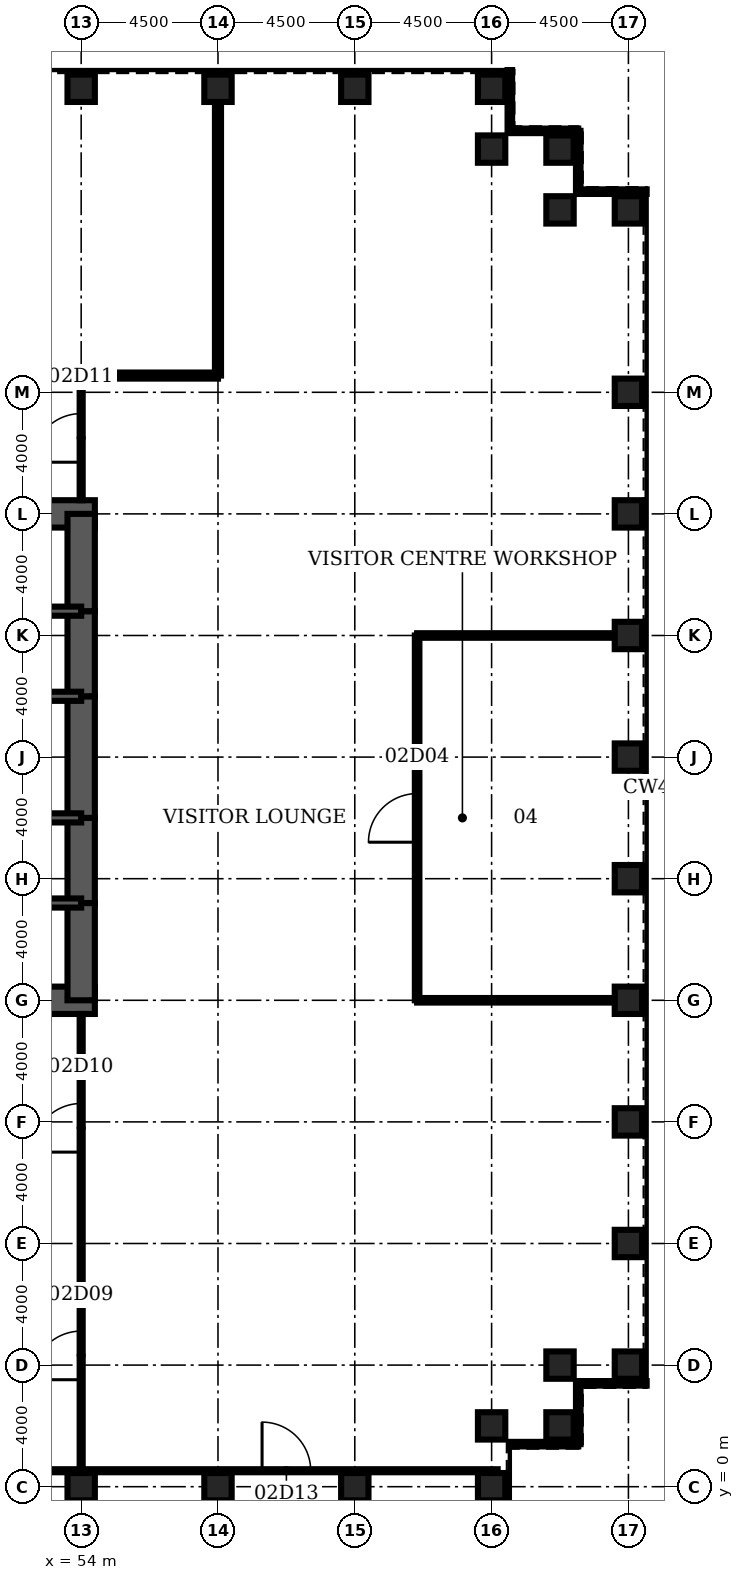
"""IFC4 building model, lengths in metres.
Left out: names, types, materials, properties, quantities, classifications, styles, units other than length and angle.
Written with IfcOpenShell. Run it as: python <this file> out.ifc"""

import sys

from ifc_helpers import new_model, si_unit, direction, frame, frame_2d, origin, origin_2d, place, context, subcontext, project, spatial, rectangle, hollow_rectangle, extrude, element, fill, save


model = new_model("IFC4")
c1 = context("Model", 3, precision=1e-05, world=origin(), true_north=direction((0.0, 1.0)))
c2 = subcontext(c1, "Body", "Model", "MODEL_VIEW")
j1 = project(units=[si_unit("LENGTHUNIT", "METRE"), si_unit("PLANEANGLEUNIT", "RADIAN")], contexts=[c1])
p1 = place(None, origin())
s1 = spatial("IfcSite", under=j1, at=p1, CompositionType="ELEMENT")
p2 = place(p1, origin())
s2 = spatial("IfcBuilding", under=s1, at=p2, CompositionType="ELEMENT")
p3 = place(p2, frame((0.0, 0.0, 13.0)))
s3 = spatial("IfcBuildingStorey", under=s2, at=p3, CompositionType="ELEMENT", Elevation=13.0)
for number, where, z_axis, x_axis in (
    (1, (54.0, 0.0, 0.0), (0.0, 0.0, 1.0), (0.0, 1.0, 0.0)),
    (2, (58.5, 0.0, 0.0), (0.0, 0.0, 1.0), (0.0, 1.0, 0.0)),
    (3, (63.0, 0.0, 0.0), (0.0, 0.0, 1.0), (0.0, 1.0, 0.0)),
    (4, (67.5, 0.0, 0.0), (0.0, 0.0, 1.0), (0.0, 1.0, 0.0)),
    (5, (67.5, 2.0, 0.0), (0.0, 0.0, 1.0), (0.0, 1.0, 0.0)),
    (6, (69.75, 2.0, 0.0), (0.0, 0.0, 1.0), (1.0, 0.0, 0.0)),
    (7, (69.75, 4.0, 0.0), (0.0, 0.0, 1.0), (1.0, 0.0, 0.0)),
    (8, (72.0, 4.0, 0.0), (0.0, 0.0, 1.0), (1.0, 0.0, 0.0)),
    (9, (72.0, 8.0, 0.0), (0.0, 0.0, 1.0), (1.0, 0.0, 0.0)),
    (10, (72.0, 12.0, 0.0), (0.0, 0.0, 1.0), (1.0, 0.0, 0.0)),
    (11, (72.0, 16.0, 0.0), (0.0, 0.0, 1.0), (1.0, 0.0, 0.0)),
    (12, (72.0, 20.0, 0.0), (0.0, 0.0, 1.0), (1.0, 0.0, 0.0)),
    (13, (72.0, 24.0, 0.0), (0.0, 0.0, 1.0), (1.0, 0.0, 0.0)),
    (14, (72.0, 28.0, 0.0), (0.0, 0.0, 1.0), (1.0, 0.0, 0.0)),
    (15, (72.0, 32.0, 0.0), (0.0, 0.0, 1.0), (1.0, 0.0, 0.0)),
    (16, (72.0, 36.0, 0.0), (0.0, 0.0, 1.0), (1.0, 0.0, 0.0)),
    (17, (72.0, 42.0, 0.0), (0.0, 0.0, 1.0), (1.0, 0.0, 0.0)),
    (18, (69.75, 42.0, 0.0), (0.0, 0.0, 1.0), (1.0, 0.0, 0.0)),
    (19, (69.75, 44.0, 0.0), (0.0, 0.0, 1.0), (1.0, 0.0, 0.0)),
    (20, (67.5, 44.0, 0.0), (0.0, 0.0, 1.0), (0.0, 1.0, 0.0)),
    (21, (67.5, 46.0, 0.0), (0.0, 0.0, 1.0), (0.0, 1.0, 0.0)),
    (22, (63.0, 46.0, 0.0), (0.0, 0.0, 1.0), (0.0, 1.0, 0.0)),
    (23, (58.5, 46.0, 0.0), (0.0, 0.0, 1.0), (0.0, 1.0, 0.0)),
    (24, (54.0, 46.0, 0.0), (0.0, 0.0, 1.0), (0.0, 1.0, 0.0)),
):
    element("IfcColumn", number, at=place(p3, frame(where, z_axis=z_axis, x_axis=x_axis)), inside=s3, PredefinedType="COLUMN", context=c2, shape_type="SweptSolid", body=[
        extrude(hollow_rectangle(XDim=0.9, YDim=0.9, WallThickness=0.12, at=origin_2d()), origin(), (0.0, 0.0, 1.0), 5.0),
    ])
for number, where, z_axis, x_axis in (
    (25, (45.0, 16.0, 0.0), (0.0, 0.0, 1.0), (1.0, 0.0, 0.0)),
    (26, (54.45, 32.0, 0.0), (0.0, 0.0, 1.0), (-1.0, 0.0, 0.0)),
):
    element("IfcWall", number, at=place(p3, frame(where, z_axis=z_axis, x_axis=x_axis)), inside=s3, PredefinedType="SHEAR", context=c2, shape_type="SweptSolid", body=[
        extrude(rectangle(XDim=9.45, YDim=0.9, at=frame_2d((4.725, 0.0))), origin(), (0.0, 0.0, 1.0), 5.0),
    ])
p4 = place(p3, frame((54.0, 16.0, 0.0), z_axis=(0.0, 0.0, 1.0), x_axis=(0.0, 1.0, 0.0)))
e27 = element("IfcWall", 27, at=p4, inside=s3, PredefinedType="SHEAR", context=c2, shape_type="SweptSolid", body=[
    extrude(rectangle(XDim=3.2, YDim=0.9, at=frame_2d((1.6, 0.0))), origin(), (0.0, 0.0, 1.0), 5.0),
])
p5 = place(p3, frame((54.0, 19.2, 0.0), z_axis=(0.0, 0.0, 1.0), x_axis=(0.0, 1.0, 0.0)))
e28 = element("IfcWall", 28, at=p5, inside=s3, PredefinedType="SHEAR", context=c2, shape_type="SweptSolid", body=[
    extrude(rectangle(XDim=2.8, YDim=0.9, at=frame_2d((1.4, 0.0))), origin(), (0.0, 0.0, 1.0), 5.0),
])
p6 = place(p5, frame((0.4, 0.0, 0.0)))
e29 = element("IfcOpeningElement", 29, at=p6, cuts=e28, PredefinedType="OPENING", context=c2, shape_type="SweptSolid", body=[
    extrude(rectangle(XDim=1.8, YDim=2.1, at=frame_2d((0.9, 1.05))), frame((0.0, 0.46, 0.0), z_axis=(0.0, -1.0, 0.0), x_axis=(1.0, 0.0, 0.0)), (0.0, 0.0, 1.0), 0.92),
])
p7 = place(p3, frame((54.0, 22.0, 0.0), z_axis=(0.0, 0.0, 1.0), x_axis=(0.0, 1.0, 0.0)))
e30 = element("IfcWall", 30, at=p7, inside=s3, PredefinedType="SHEAR", context=c2, shape_type="SweptSolid", body=[
    extrude(rectangle(XDim=4.0, YDim=0.9, at=frame_2d((2.0, 0.0))), origin(), (0.0, 0.0, 1.0), 5.0),
])
p8 = place(p3, frame((54.0, 26.0, 0.0), z_axis=(0.0, 0.0, 1.0), x_axis=(0.0, 1.0, 0.0)))
e31 = element("IfcWall", 31, at=p8, inside=s3, PredefinedType="SHEAR", context=c2, shape_type="SweptSolid", body=[
    extrude(rectangle(XDim=2.8, YDim=0.9, at=frame_2d((1.4, 0.0))), origin(), (0.0, 0.0, 1.0), 5.0),
])
p9 = place(p8, frame((0.6, 0.0, 0.0)))
e32 = element("IfcOpeningElement", 32, at=p9, cuts=e31, PredefinedType="OPENING", context=c2, shape_type="SweptSolid", body=[
    extrude(rectangle(XDim=1.8, YDim=2.1, at=frame_2d((0.9, 1.05))), frame((0.0, 0.46, 0.0), z_axis=(0.0, -1.0, 0.0), x_axis=(1.0, 0.0, 0.0)), (0.0, 0.0, 1.0), 0.92),
])
p10 = place(p3, frame((54.0, 28.8, 0.0), z_axis=(0.0, 0.0, 1.0), x_axis=(0.0, 1.0, 0.0)))
e33 = element("IfcWall", 33, at=p10, inside=s3, PredefinedType="SHEAR", context=c2, shape_type="SweptSolid", body=[
    extrude(rectangle(XDim=3.2, YDim=0.9, at=frame_2d((1.6, 0.0))), origin(), (0.0, 0.0, 1.0), 5.0),
])
p11 = place(p3, frame((45.0, 19.2, 0.0), z_axis=(0.0, 0.0, 1.0), x_axis=(1.0, 0.0, 0.0)))
e34 = element("IfcWall", 34, at=p11, inside=s3, PredefinedType="SOLIDWALL", context=c2, shape_type="SweptSolid", body=[
    extrude(rectangle(XDim=9.0, YDim=0.3, at=frame_2d((4.5, 0.0))), origin(), (0.0, 0.0, 1.0), 5.0),
])
p12 = place(p11, frame((7.35, 0.0, 0.0)))
e35 = element("IfcOpeningElement", 35, at=p12, cuts=e34, PredefinedType="OPENING", context=c2, shape_type="SweptSolid", body=[
    extrude(rectangle(XDim=1.0, YDim=2.1, at=frame_2d((0.5, 1.05))), frame((0.0, 0.16, 0.0), z_axis=(0.0, -1.0, 0.0), x_axis=(1.0, 0.0, 0.0)), (0.0, 0.0, 1.0), 0.32),
])
p13 = place(p3, frame((45.0, 28.8, 0.0), z_axis=(0.0, 0.0, 1.0), x_axis=(1.0, 0.0, 0.0)))
e36 = element("IfcWall", 36, at=p13, inside=s3, PredefinedType="SOLIDWALL", context=c2, shape_type="SweptSolid", body=[
    extrude(rectangle(XDim=9.0, YDim=0.3, at=frame_2d((4.5, 0.0))), origin(), (0.0, 0.0, 1.0), 5.0),
])
p14 = place(p13, frame((7.35, 0.0, 0.0)))
e37 = element("IfcOpeningElement", 37, at=p14, cuts=e36, PredefinedType="OPENING", context=c2, shape_type="SweptSolid", body=[
    extrude(rectangle(XDim=1.0, YDim=2.1, at=frame_2d((0.5, 1.05))), frame((0.0, 0.16, 0.0), z_axis=(0.0, -1.0, 0.0), x_axis=(1.0, 0.0, 0.0)), (0.0, 0.0, 1.0), 0.32),
])
p15 = place(p3, frame((48.0, 22.0, 0.0), z_axis=(0.0, 0.0, 1.0), x_axis=(1.0, 0.0, 0.0)))
e38 = element("IfcWall", 38, at=p15, inside=s3, PredefinedType="SOLIDWALL", context=c2, shape_type="SweptSolid", body=[
    extrude(rectangle(XDim=6.0, YDim=0.3, at=frame_2d((3.0, 0.0))), origin(), (0.0, 0.0, 1.0), 5.0),
])
p16 = place(p15, frame((2.0, 0.0, 0.0)))
e39 = element("IfcOpeningElement", 39, at=p16, cuts=e38, PredefinedType="OPENING", context=c2, shape_type="SweptSolid", body=[
    extrude(rectangle(XDim=1.0, YDim=2.1, at=frame_2d((0.5, 1.05))), frame((0.0, 0.16, 0.0), z_axis=(0.0, -1.0, 0.0), x_axis=(1.0, 0.0, 0.0)), (0.0, 0.0, 1.0), 0.32),
])
p17 = place(p15, frame((4.15, 0.0, 0.0)))
e40 = element("IfcOpeningElement", 40, at=p17, cuts=e38, PredefinedType="OPENING", context=c2, shape_type="SweptSolid", body=[
    extrude(rectangle(XDim=1.0, YDim=2.1, at=frame_2d((0.5, 1.05))), frame((0.0, 0.16, 0.0), z_axis=(0.0, -1.0, 0.0), x_axis=(1.0, 0.0, 0.0)), (0.0, 0.0, 1.0), 0.32),
])
p18 = place(p3, frame((48.0, 26.0, 0.0), z_axis=(0.0, 0.0, 1.0), x_axis=(1.0, 0.0, 0.0)))
e41 = element("IfcWall", 41, at=p18, inside=s3, PredefinedType="SOLIDWALL", context=c2, shape_type="SweptSolid", body=[
    extrude(rectangle(XDim=6.0, YDim=0.3, at=frame_2d((3.0, 0.0))), origin(), (0.0, 0.0, 1.0), 5.0),
])
for number, where, z_axis, x_axis in (
    (42, (65.05, 16.0, 0.0), (0.0, 0.0, 1.0), (1.0, 0.0, 0.0)),
    (43, (65.05, 28.0, 0.0), (0.0, 0.0, 1.0), (1.0, 0.0, 0.0)),
):
    element("IfcWall", number, at=place(p3, frame(where, z_axis=z_axis, x_axis=x_axis)), inside=s3, PredefinedType="PARTITIONING", context=c2, shape_type="SweptSolid", body=[
        extrude(rectangle(XDim=6.5, YDim=0.15, at=frame_2d((3.25, 0.0))), origin(), (0.0, 0.0, 1.0), 3.0),
    ])
p19 = place(p3, frame((13.5, 36.55, 0.0), z_axis=(0.0, 0.0, 1.0), x_axis=(1.0, 0.0, 0.0)))
e44 = element("IfcWall", 44, at=p19, inside=s3, PredefinedType="PARTITIONING", context=c2, shape_type="SweptSolid", body=[
    extrude(rectangle(XDim=45.0, YDim=0.2, at=frame_2d((22.5, 0.0))), origin(), (0.0, 0.0, 1.0), 3.0),
])
p20 = place(p19, frame((21.7, 0.0, 0.0)))
e45 = element("IfcOpeningElement", 45, at=p20, cuts=e44, PredefinedType="OPENING", context=c2, shape_type="SweptSolid", body=[
    extrude(rectangle(XDim=1.6, YDim=2.1, at=frame_2d((0.8, 1.05))), frame((0.0, 0.11, 0.0), z_axis=(0.0, -1.0, 0.0), x_axis=(1.0, 0.0, 0.0)), (0.0, 0.0, 1.0), 0.22),
])
p21 = place(p3, frame((54.0, 0.575, 0.0), z_axis=(0.0, 0.0, 1.0), x_axis=(0.0, 1.0, 0.0)))
e46 = element("IfcWall", 46, at=p21, inside=s3, PredefinedType="PARTITIONING", context=c2, shape_type="SweptSolid", body=[
    extrude(rectangle(XDim=14.975, YDim=0.1, at=frame_2d((7.488, 0.0))), origin(), (0.0, 0.0, 1.0), 3.0),
])
p22 = place(p21, frame((2.944, 0.0, 0.0)))
e47 = element("IfcOpeningElement", 47, at=p22, cuts=e46, PredefinedType="OPENING", context=c2, shape_type="SweptSolid", body=[
    extrude(rectangle(XDim=1.6, YDim=2.1, at=frame_2d((0.8, 1.05))), frame((0.0, 0.06, 0.0), z_axis=(0.0, -1.0, 0.0), x_axis=(1.0, 0.0, 0.0)), (0.0, 0.0, 1.0), 0.12),
])
p23 = place(p21, frame((10.431, 0.0, 0.0)))
e48 = element("IfcOpeningElement", 48, at=p23, cuts=e46, PredefinedType="OPENING", context=c2, shape_type="SweptSolid", body=[
    extrude(rectangle(XDim=1.6, YDim=2.1, at=frame_2d((0.8, 1.05))), frame((0.0, 0.06, 0.0), z_axis=(0.0, -1.0, 0.0), x_axis=(1.0, 0.0, 0.0)), (0.0, 0.0, 1.0), 0.12),
])
p24 = place(p3, frame((54.0, 32.45, 0.0), z_axis=(0.0, 0.0, 1.0), x_axis=(0.0, 1.0, 0.0)))
e49 = element("IfcWall", 49, at=p24, inside=s3, PredefinedType="PARTITIONING", context=c2, shape_type="SweptSolid", body=[
    extrude(rectangle(XDim=4.1, YDim=0.1, at=frame_2d((2.05, 0.0))), origin(), (0.0, 0.0, 1.0), 3.0),
])
p25 = place(p24, frame((1.25, 0.0, 0.0)))
e50 = element("IfcOpeningElement", 50, at=p25, cuts=e49, PredefinedType="OPENING", context=c2, shape_type="SweptSolid", body=[
    extrude(rectangle(XDim=1.6, YDim=2.1, at=frame_2d((0.8, 1.05))), frame((0.0, 0.06, 0.0), z_axis=(0.0, -1.0, 0.0), x_axis=(1.0, 0.0, 0.0)), (0.0, 0.0, 1.0), 0.12),
])
p26 = place(p3, frame((58.5, 36.55, 0.0), z_axis=(0.0, 0.0, 1.0), x_axis=(0.0, 1.0, 0.0)))
e51 = element("IfcWall", 51, at=p26, inside=s3, PredefinedType="PARTITIONING", context=c2, shape_type="SweptSolid", body=[
    extrude(rectangle(XDim=9.0, YDim=0.2, at=frame_2d((4.5, 0.0))), origin(), (0.0, 0.0, 1.0), 3.0),
])
p27 = place(p3, frame((65.05, 16.0, 0.0), z_axis=(0.0, 0.0, 1.0), x_axis=(0.0, 1.0, 0.0)))
e52 = element("IfcWall", 52, at=p27, inside=s3, PredefinedType="PARTITIONING", context=c2, shape_type="SweptSolid", body=[
    extrude(rectangle(XDim=12.0, YDim=0.15, at=frame_2d((6.0, 0.0))), origin(), (0.0, 0.0, 1.0), 3.0),
])
p28 = place(p27, frame((5.2, 0.0, 0.0)))
e53 = element("IfcOpeningElement", 53, at=p28, cuts=e52, PredefinedType="OPENING", context=c2, shape_type="SweptSolid", body=[
    extrude(rectangle(XDim=1.6, YDim=2.1, at=frame_2d((0.8, 1.05))), frame((0.0, 0.085, 0.0), z_axis=(0.0, -1.0, 0.0), x_axis=(1.0, 0.0, 0.0)), (0.0, 0.0, 1.0), 0.17),
])
p29 = place(p3, frame((49.5, 0.525, 0.0), z_axis=(0.0, 0.0, 1.0), x_axis=(1.0, 0.0, 0.0)))
e54 = element("IfcWall", 54, at=p29, inside=s3, PredefinedType="PARTITIONING", context=c2, shape_type="SweptSolid", body=[
    extrude(rectangle(XDim=18.2, YDim=0.1, at=frame_2d((9.1, 0.0))), origin(), (0.0, 0.0, 1.0), 3.0),
])
p30 = place(p29, frame((10.45, 0.0, 0.0)))
e55 = element("IfcOpeningElement", 55, at=p30, cuts=e54, PredefinedType="OPENING", context=c2, shape_type="SweptSolid", body=[
    extrude(rectangle(XDim=1.6, YDim=2.1, at=frame_2d((0.8, 1.05))), frame((0.0, 0.06, 0.0), z_axis=(0.0, -1.0, 0.0), x_axis=(1.0, 0.0, 0.0)), (0.0, 0.0, 1.0), 0.12),
])
p31 = place(p3, frame((68.1, 1.4, 0.0), z_axis=(0.0, 0.0, 1.0), x_axis=(1.0, 0.0, 0.0)))
e56 = element("IfcWall", 56, at=p31, inside=s3, PredefinedType="ELEMENTEDWALL", context=c2, shape_type="SweptSolid", body=[
    extrude(rectangle(XDim=2.25, YDim=0.15, at=frame_2d((1.125, 0.0))), origin(), (0.0, 0.0, 1.0), 4.82),
])
p32 = place(p3, frame((70.35, 1.4, 0.0), z_axis=(0.0, 0.0, 1.0), x_axis=(0.0, 1.0, 0.0)))
e57 = element("IfcWall", 57, at=p32, inside=s3, PredefinedType="ELEMENTEDWALL", context=c2, shape_type="SweptSolid", body=[
    extrude(rectangle(XDim=2.0, YDim=0.15, at=frame_2d((1.0, 0.0))), origin(), (0.0, 0.0, 1.0), 4.82),
])
for number, where, z_axis, x_axis in (
    (58, (70.35, 3.4, 0.0), (0.0, 0.0, 1.0), (1.0, 0.0, 0.0)),
    (59, (72.6, 42.6, 0.0), (0.0, 0.0, 1.0), (-1.0, 0.0, 0.0)),
):
    element("IfcWall", number, at=place(p3, frame(where, z_axis=z_axis, x_axis=x_axis)), inside=s3, PredefinedType="ELEMENTEDWALL", context=c2, shape_type="SweptSolid", body=[
        extrude(rectangle(XDim=2.25, YDim=0.15, at=frame_2d((1.125, 0.0))), origin(), (0.0, 0.0, 1.0), 4.82),
    ])
p33 = place(p3, frame((70.35, 42.6, 0.0), z_axis=(0.0, 0.0, 1.0), x_axis=(0.0, 1.0, 0.0)))
e60 = element("IfcWall", 60, at=p33, inside=s3, PredefinedType="ELEMENTEDWALL", context=c2, shape_type="SweptSolid", body=[
    extrude(rectangle(XDim=2.0, YDim=0.15, at=frame_2d((1.0, 0.0))), origin(), (0.0, 0.0, 1.0), 4.82),
])
p34 = place(p3, frame((70.35, 44.6, 0.0), z_axis=(0.0, 0.0, 1.0), x_axis=(-1.0, 0.0, 0.0)))
e61 = element("IfcWall", 61, at=p34, inside=s3, PredefinedType="ELEMENTEDWALL", context=c2, shape_type="SweptSolid", body=[
    extrude(rectangle(XDim=2.25, YDim=0.15, at=frame_2d((1.125, 0.0))), origin(), (0.0, 0.0, 1.0), 4.82),
])
p35 = place(p3, frame((68.1, 44.6, 0.0), z_axis=(0.0, 0.0, 1.0), x_axis=(0.0, 1.0, 0.0)))
e62 = element("IfcWall", 62, at=p35, inside=s3, PredefinedType="ELEMENTEDWALL", context=c2, shape_type="SweptSolid", body=[
    extrude(rectangle(XDim=2.0, YDim=0.15, at=frame_2d((1.0, 0.0))), origin(), (0.0, 0.0, 1.0), 4.82),
])
p36 = place(p28, origin())
e63 = element("IfcDoor", 63, at=p36, inside=s3, OperationType="SINGLE_SWING_LEFT", PredefinedType="DOOR", context=c2, shape_type="SweptSolid", body=[
    extrude(rectangle(XDim=1.6, YDim=2.1, at=frame_2d((0.8, 1.05))), frame((0.0, 0.025, 0.0), z_axis=(0.0, -1.0, 0.0), x_axis=(1.0, 0.0, 0.0)), (0.0, 0.0, 1.0), 0.05),
])
fill(e53, e63)
p37 = place(p22, origin())
e64 = element("IfcDoor", 64, at=p37, inside=s3, OperationType="SINGLE_SWING_LEFT", PredefinedType="DOOR", context=c2, shape_type="SweptSolid", body=[
    extrude(rectangle(XDim=1.6, YDim=2.1, at=frame_2d((0.8, 1.05))), frame((0.0, 0.025, 0.0), z_axis=(0.0, -1.0, 0.0), x_axis=(1.0, 0.0, 0.0)), (0.0, 0.0, 1.0), 0.05),
])
fill(e47, e64)
p38 = place(p23, origin())
e65 = element("IfcDoor", 65, at=p38, inside=s3, OperationType="SINGLE_SWING_LEFT", PredefinedType="DOOR", context=c2, shape_type="SweptSolid", body=[
    extrude(rectangle(XDim=1.6, YDim=2.1, at=frame_2d((0.8, 1.05))), frame((0.0, 0.025, 0.0), z_axis=(0.0, -1.0, 0.0), x_axis=(1.0, 0.0, 0.0)), (0.0, 0.0, 1.0), 0.05),
])
fill(e48, e65)
p39 = place(p25, origin())
e66 = element("IfcDoor", 66, at=p39, inside=s3, OperationType="SINGLE_SWING_LEFT", PredefinedType="DOOR", context=c2, shape_type="SweptSolid", body=[
    extrude(rectangle(XDim=1.6, YDim=2.1, at=frame_2d((0.8, 1.05))), frame((0.0, 0.025, 0.0), z_axis=(0.0, -1.0, 0.0), x_axis=(1.0, 0.0, 0.0)), (0.0, 0.0, 1.0), 0.05),
])
fill(e50, e66)
p40 = place(p30, origin())
e67 = element("IfcDoor", 67, at=p40, inside=s3, OperationType="SINGLE_SWING_LEFT", PredefinedType="DOOR", context=c2, shape_type="SweptSolid", body=[
    extrude(rectangle(XDim=1.6, YDim=2.1, at=frame_2d((0.8, 1.05))), frame((0.0, 0.025, 0.0), z_axis=(0.0, -1.0, 0.0), x_axis=(1.0, 0.0, 0.0)), (0.0, 0.0, 1.0), 0.05),
])
fill(e55, e67)
p41 = place(p12, origin())
e68 = element("IfcDoor", 68, at=p41, inside=s3, OperationType="SINGLE_SWING_RIGHT", PredefinedType="DOOR", context=c2, shape_type="SweptSolid", body=[
    extrude(rectangle(XDim=1.0, YDim=2.1, at=frame_2d((0.5, 1.05))), frame((0.0, 0.025, 0.0), z_axis=(0.0, -1.0, 0.0), x_axis=(1.0, 0.0, 0.0)), (0.0, 0.0, 1.0), 0.05),
])
fill(e35, e68)
p42 = place(p14, origin())
e69 = element("IfcDoor", 69, at=p42, inside=s3, OperationType="SINGLE_SWING_RIGHT", PredefinedType="DOOR", context=c2, shape_type="SweptSolid", body=[
    extrude(rectangle(XDim=1.0, YDim=2.1, at=frame_2d((0.5, 1.05))), frame((0.0, 0.025, 0.0), z_axis=(0.0, -1.0, 0.0), x_axis=(1.0, 0.0, 0.0)), (0.0, 0.0, 1.0), 0.05),
])
fill(e37, e69)
p43 = place(p6, origin())
e70 = element("IfcDoor", 70, at=p43, inside=s3, OperationType="SINGLE_SWING_LEFT", PredefinedType="DOOR", context=c2, shape_type="SweptSolid", body=[
    extrude(rectangle(XDim=1.8, YDim=2.1, at=frame_2d((0.9, 1.05))), frame((0.0, 0.45, 0.0), z_axis=(0.0, -1.0, 0.0), x_axis=(1.0, 0.0, 0.0)), (0.0, 0.0, 1.0), 0.899),
])
fill(e29, e70)
p44 = place(p9, origin())
e71 = element("IfcDoor", 71, at=p44, inside=s3, OperationType="SINGLE_SWING_LEFT", PredefinedType="DOOR", context=c2, shape_type="SweptSolid", body=[
    extrude(rectangle(XDim=1.8, YDim=2.1, at=frame_2d((0.9, 1.05))), frame((0.0, 0.45, 0.0), z_axis=(0.0, -1.0, 0.0), x_axis=(1.0, 0.0, 0.0)), (0.0, 0.0, 1.0), 0.899),
])
fill(e32, e71)
p45 = place(p17, origin())
e72 = element("IfcDoor", 72, at=p45, inside=s3, OperationType="SINGLE_SWING_RIGHT", PredefinedType="DOOR", context=c2, shape_type="SweptSolid", body=[
    extrude(rectangle(XDim=1.0, YDim=2.1, at=frame_2d((0.5, 1.05))), frame((0.0, 0.025, 0.0), z_axis=(0.0, -1.0, 0.0), x_axis=(1.0, 0.0, 0.0)), (0.0, 0.0, 1.0), 0.05),
])
fill(e40, e72)
save(model, sys.argv[1])
